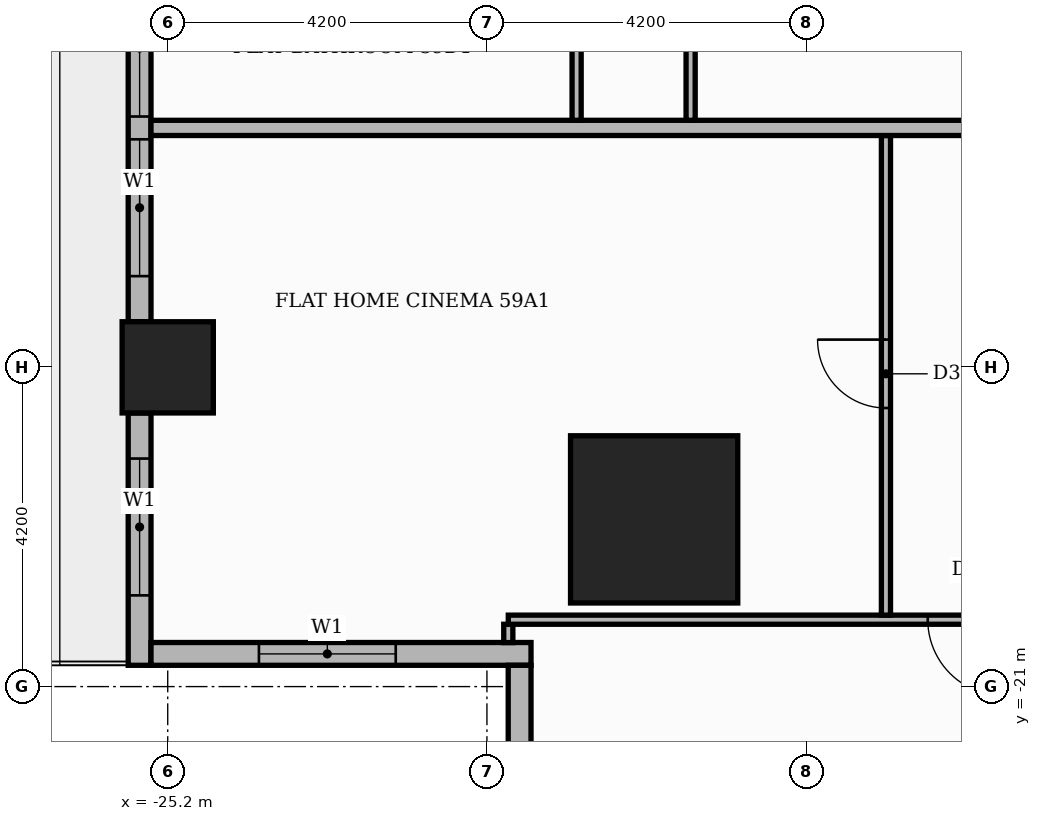
"""IFC4 building model, lengths in metres.
Left out: names, types, materials, properties, quantities, classifications, styles, units other than length and angle.
Written with IfcOpenShell. Run it as: python <this file> out.ifc"""

import sys

from ifc_helpers import new_model, si_unit, direction, frame, frame_2d, origin, origin_2d, place, context, subcontext, project, spatial, rectangle, extrude, element, fill, save


model = new_model("IFC4")
c1 = context("Model", 3, precision=1e-05, world=origin(), true_north=direction((0.0, 1.0)))
c2 = subcontext(c1, "Body", "Model", "MODEL_VIEW")
j1 = project(units=[si_unit("LENGTHUNIT", "METRE"), si_unit("PLANEANGLEUNIT", "RADIAN")], contexts=[c1])
p1 = place(None, origin())
s1 = spatial("IfcSite", under=j1, at=p1, CompositionType="ELEMENT")
p2 = place(p1, origin())
s2 = spatial("IfcBuilding", under=s1, at=p2, CompositionType="ELEMENT")
p3 = place(p2, frame((0.0, 0.0, 248.4)))
s3 = spatial("IfcBuildingStorey", under=s2, at=p3, CompositionType="ELEMENT", Elevation=248.4)
p4 = place(p3, frame((-18.8, -18.8, 0.0), z_axis=(0.0, 0.0, 1.0), x_axis=(1.0, 0.0, 0.0)))
e1 = element("IfcColumn", 1, at=p4, inside=s3, PredefinedType="COLUMN", context=c2, shape_type="SweptSolid", body=[
    extrude(rectangle(XDim=2.2, YDim=2.2, at=origin_2d()), origin(), (0.0, 0.0, 1.0), 3.9),
])
p5 = place(p3, frame((-25.2, -16.8, 0.0), z_axis=(0.0, 0.0, 1.0), x_axis=(1.0, 0.0, 0.0)))
e2 = element("IfcColumn", 2, at=p5, inside=s3, PredefinedType="COLUMN", context=c2, shape_type="SweptSolid", body=[
    extrude(rectangle(XDim=1.2, YDim=1.2, at=origin_2d()), origin(), (0.0, 0.0, 1.0), 3.9),
])
p6 = place(p3, frame((-25.57, -9.0, 0.0), z_axis=(0.0, 0.0, 1.0), x_axis=(0.0, -1.0, 0.0)))
e3 = element("IfcWall", 3, at=p6, inside=s3, PredefinedType="STANDARD", context=c2, shape_type="SweptSolid", body=[
    extrude(rectangle(XDim=7.2, YDim=0.3, at=frame_2d((3.6, 0.0))), origin(), (0.0, 0.0, 1.0), 3.48),
])
p7 = place(p6, frame((0.6, 0.0, 0.9)))
e4 = element("IfcOpeningElement", 4, at=p7, cuts=e3, PredefinedType="OPENING", context=c2, shape_type="SweptSolid", body=[
    extrude(rectangle(XDim=1.8, YDim=2.1, at=frame_2d((0.9, 1.05))), frame((0.0, 0.16, 0.0), z_axis=(0.0, -1.0, 0.0), x_axis=(1.0, 0.0, 0.0)), (0.0, 0.0, 1.0), 0.32),
])
p8 = place(p6, frame((2.7, 0.0, 0.9)))
e5 = element("IfcOpeningElement", 5, at=p8, cuts=e3, PredefinedType="OPENING", context=c2, shape_type="SweptSolid", body=[
    extrude(rectangle(XDim=1.8, YDim=2.1, at=frame_2d((0.9, 1.05))), frame((0.0, 0.16, 0.0), z_axis=(0.0, -1.0, 0.0), x_axis=(1.0, 0.0, 0.0)), (0.0, 0.0, 1.0), 0.32),
])
p9 = place(p6, frame((4.8, 0.0, 0.9)))
e6 = element("IfcOpeningElement", 6, at=p9, cuts=e3, PredefinedType="OPENING", context=c2, shape_type="SweptSolid", body=[
    extrude(rectangle(XDim=1.8, YDim=2.1, at=frame_2d((0.9, 1.05))), frame((0.0, 0.16, 0.0), z_axis=(0.0, -1.0, 0.0), x_axis=(1.0, 0.0, 0.0)), (0.0, 0.0, 1.0), 0.32),
])
p10 = place(p3, frame((-25.57, -17.4, 0.0), z_axis=(0.0, 0.0, 1.0), x_axis=(0.0, -1.0, 0.0)))
e7 = element("IfcWall", 7, at=p10, inside=s3, PredefinedType="STANDARD", context=c2, shape_type="SweptSolid", body=[
    extrude(rectangle(XDim=3.32, YDim=0.3, at=frame_2d((1.66, 0.0))), origin(), (0.0, 0.0, 1.0), 3.48),
])
p11 = place(p10, frame((0.6, 0.0, 0.9)))
e8 = element("IfcOpeningElement", 8, at=p11, cuts=e7, PredefinedType="OPENING", context=c2, shape_type="SweptSolid", body=[
    extrude(rectangle(XDim=1.8, YDim=2.1, at=frame_2d((0.9, 1.05))), frame((0.0, 0.16, 0.0), z_axis=(0.0, -1.0, 0.0), x_axis=(1.0, 0.0, 0.0)), (0.0, 0.0, 1.0), 0.32),
])
p12 = place(p3, frame((-25.42, -20.57, 0.0), z_axis=(0.0, 0.0, 1.0), x_axis=(1.0, 0.0, 0.0)))
e9 = element("IfcWall", 9, at=p12, inside=s3, PredefinedType="STANDARD", context=c2, shape_type="SweptSolid", body=[
    extrude(rectangle(XDim=5.0, YDim=0.3, at=frame_2d((2.5, 0.0))), origin(), (0.0, 0.0, 1.0), 3.48),
])
p13 = place(p12, frame((1.42, 0.0, 0.9)))
e10 = element("IfcOpeningElement", 10, at=p13, cuts=e9, PredefinedType="OPENING", context=c2, shape_type="SweptSolid", body=[
    extrude(rectangle(XDim=1.8, YDim=2.1, at=frame_2d((0.9, 1.05))), frame((0.0, 0.16, 0.0), z_axis=(0.0, -1.0, 0.0), x_axis=(1.0, 0.0, 0.0)), (0.0, 0.0, 1.0), 0.32),
])
p14 = place(p3, frame((-20.57, -20.72, 0.0), z_axis=(0.0, 0.0, 1.0), x_axis=(0.0, -1.0, 0.0)))
e11 = element("IfcWall", 11, at=p14, inside=s3, PredefinedType="STANDARD", context=c2, shape_type="SweptSolid", body=[
    extrude(rectangle(XDim=5.0, YDim=0.3, at=frame_2d((2.5, 0.0))), origin(), (0.0, 0.0, 1.0), 3.48),
])
p15 = place(p14, frame((1.48, 0.0, 0.9)))
e12 = element("IfcOpeningElement", 12, at=p15, cuts=e11, PredefinedType="OPENING", context=c2, shape_type="SweptSolid", body=[
    extrude(rectangle(XDim=1.8, YDim=2.1, at=frame_2d((0.9, 1.05))), frame((0.0, 0.16, 0.0), z_axis=(0.0, -1.0, 0.0), x_axis=(1.0, 0.0, 0.0)), (0.0, 0.0, 1.0), 0.32),
])
p16 = place(p3, frame((-20.719, -20.421, 0.0), z_axis=(0.0, 0.0, 1.0), x_axis=(0.0, 1.0, 0.0)))
e13 = element("IfcWall", 13, at=p16, inside=s3, PredefinedType="PARTITIONING", context=c2, shape_type="SweptSolid", body=[
    extrude(rectangle(XDim=0.241, YDim=0.12, at=frame_2d((0.121, 0.0))), origin(), (0.0, 0.0, 1.0), 3.48),
])
p17 = place(p3, frame((-20.719, -20.12, 0.0), z_axis=(0.0, 0.0, 1.0), x_axis=(1.0, 0.0, 0.0)))
e14 = element("IfcWall", 14, at=p17, inside=s3, PredefinedType="PARTITIONING", context=c2, shape_type="SweptSolid", body=[
    extrude(rectangle(XDim=15.469, YDim=0.12, at=frame_2d((7.734, 0.0))), origin(), (0.0, 0.0, 1.0), 3.48),
])
p18 = place(p17, frame((5.519, 0.0, 0.0)))
e15 = element("IfcOpeningElement", 15, at=p18, cuts=e14, PredefinedType="OPENING", context=c2, shape_type="SweptSolid", body=[
    extrude(rectangle(XDim=1.0, YDim=2.1, at=frame_2d((0.5, 1.05))), frame((0.0, 0.07, 0.0), z_axis=(0.0, -1.0, 0.0), x_axis=(1.0, 0.0, 0.0)), (0.0, 0.0, 1.0), 0.14),
])
p19 = place(p17, frame((8.719, 0.0, 0.0)))
e16 = element("IfcOpeningElement", 16, at=p19, cuts=e14, PredefinedType="OPENING", context=c2, shape_type="SweptSolid", body=[
    extrude(rectangle(XDim=0.9, YDim=2.1, at=frame_2d((0.45, 1.05))), frame((0.0, 0.07, 0.0), z_axis=(0.0, -1.0, 0.0), x_axis=(1.0, 0.0, 0.0)), (0.0, 0.0, 1.0), 0.14),
])
p20 = place(p3, frame((-15.75, -20.06, 0.0), z_axis=(0.0, 0.0, 1.0), x_axis=(0.0, 1.0, 0.0)))
e17 = element("IfcWall", 17, at=p20, inside=s3, PredefinedType="PARTITIONING", context=c2, shape_type="SweptSolid", body=[
    extrude(rectangle(XDim=6.31, YDim=0.12, at=frame_2d((3.155, 0.0))), origin(), (0.0, 0.0, 1.0), 3.48),
])
p21 = place(p20, frame((2.725, 0.0, 0.0)))
e18 = element("IfcOpeningElement", 18, at=p21, cuts=e17, PredefinedType="OPENING", context=c2, shape_type="SweptSolid", body=[
    extrude(rectangle(XDim=0.9, YDim=2.1, at=frame_2d((0.45, 1.05))), frame((0.0, 0.07, 0.0), z_axis=(0.0, -1.0, 0.0), x_axis=(1.0, 0.0, 0.0)), (0.0, 0.0, 1.0), 0.14),
])
p22 = place(p3, frame((-25.42, -13.65, 0.0), z_axis=(0.0, 0.0, 1.0), x_axis=(1.0, 0.0, 0.0)))
e19 = element("IfcWall", 19, at=p22, inside=s3, PredefinedType="PARTITIONING", context=c2, shape_type="SweptSolid", body=[
    extrude(rectangle(XDim=39.07, YDim=0.2, at=frame_2d((19.535, 0.0))), origin(), (0.0, 0.0, 1.0), 3.48),
])
p23 = place(p22, frame((13.32, 0.0, 0.0)))
e20 = element("IfcOpeningElement", 20, at=p23, cuts=e19, PredefinedType="OPENING", context=c2, shape_type="SweptSolid", body=[
    extrude(rectangle(XDim=1.1, YDim=2.4, at=frame_2d((0.55, 1.2))), frame((0.0, 0.11, 0.0), z_axis=(0.0, -1.0, 0.0), x_axis=(1.0, 0.0, 0.0)), (0.0, 0.0, 1.0), 0.22),
])
p24 = place(p3, frame((-19.82, -13.55, 0.0), z_axis=(0.0, 0.0, 1.0), x_axis=(0.0, 1.0, 0.0)))
e21 = element("IfcWall", 21, at=p24, inside=s3, PredefinedType="PARTITIONING", context=c2, shape_type="SweptSolid", body=[
    extrude(rectangle(XDim=1.94, YDim=0.12, at=frame_2d((0.97, 0.0))), origin(), (0.0, 0.0, 1.0), 3.48),
])
p25 = place(p3, frame((-18.32, -13.55, 0.0), z_axis=(0.0, 0.0, 1.0), x_axis=(0.0, 1.0, 0.0)))
e22 = element("IfcWall", 22, at=p25, inside=s3, PredefinedType="PARTITIONING", context=c2, shape_type="SweptSolid", body=[
    extrude(rectangle(XDim=3.59, YDim=0.12, at=frame_2d((1.795, 0.0))), origin(), (0.0, 0.0, 1.0), 3.48),
])
p26 = place(p25, frame((1.325, 0.0, 0.0)))
e23 = element("IfcOpeningElement", 23, at=p26, cuts=e22, PredefinedType="OPENING", context=c2, shape_type="SweptSolid", body=[
    extrude(rectangle(XDim=0.9, YDim=2.1, at=frame_2d((0.45, 1.05))), frame((0.0, 0.07, 0.0), z_axis=(0.0, -1.0, 0.0), x_axis=(1.0, 0.0, 0.0)), (0.0, 0.0, 1.0), 0.14),
])
p27 = place(p8, origin())
e24 = element("IfcWindow", 24, at=p27, inside=s3, PartitioningType="SINGLE_PANEL", PredefinedType="WINDOW", context=c2, shape_type="SweptSolid", body=[
    extrude(rectangle(XDim=1.8, YDim=2.1, at=frame_2d((0.9, 1.05))), frame((0.0, 0.03, 0.0), z_axis=(0.0, -1.0, 0.0), x_axis=(1.0, 0.0, 0.0)), (0.0, 0.0, 1.0), 0.06),
])
fill(e5, e24)
p28 = place(p9, origin())
e25 = element("IfcWindow", 25, at=p28, inside=s3, PartitioningType="SINGLE_PANEL", PredefinedType="WINDOW", context=c2, shape_type="SweptSolid", body=[
    extrude(rectangle(XDim=1.8, YDim=2.1, at=frame_2d((0.9, 1.05))), frame((0.0, 0.03, 0.0), z_axis=(0.0, -1.0, 0.0), x_axis=(1.0, 0.0, 0.0)), (0.0, 0.0, 1.0), 0.06),
])
fill(e6, e25)
p29 = place(p11, origin())
e26 = element("IfcWindow", 26, at=p29, inside=s3, PartitioningType="SINGLE_PANEL", PredefinedType="WINDOW", context=c2, shape_type="SweptSolid", body=[
    extrude(rectangle(XDim=1.8, YDim=2.1, at=frame_2d((0.9, 1.05))), frame((0.0, 0.03, 0.0), z_axis=(0.0, -1.0, 0.0), x_axis=(1.0, 0.0, 0.0)), (0.0, 0.0, 1.0), 0.06),
])
fill(e8, e26)
p30 = place(p13, origin())
e27 = element("IfcWindow", 27, at=p30, inside=s3, PartitioningType="SINGLE_PANEL", PredefinedType="WINDOW", context=c2, shape_type="SweptSolid", body=[
    extrude(rectangle(XDim=1.8, YDim=2.1, at=frame_2d((0.9, 1.05))), frame((0.0, 0.03, 0.0), z_axis=(0.0, -1.0, 0.0), x_axis=(1.0, 0.0, 0.0)), (0.0, 0.0, 1.0), 0.06),
])
fill(e10, e27)
p31 = place(p21, origin())
e28 = element("IfcDoor", 28, at=p31, inside=s3, OperationType="SINGLE_SWING_RIGHT", PredefinedType="DOOR", context=c2, shape_type="SweptSolid", body=[
    extrude(rectangle(XDim=0.9, YDim=2.1, at=frame_2d((0.45, 1.05))), frame((0.0, 0.025, 0.0), z_axis=(0.0, -1.0, 0.0), x_axis=(1.0, 0.0, 0.0)), (0.0, 0.0, 1.0), 0.05),
])
fill(e18, e28)
p32 = place(p18, frame((1.0, 0.0, 0.0), z_axis=(0.0, 0.0, 1.0), x_axis=(-1.0, 0.0, 0.0)))
e29 = element("IfcDoor", 29, at=p32, inside=s3, OperationType="SINGLE_SWING_RIGHT", PredefinedType="DOOR", context=c2, shape_type="SweptSolid", body=[
    extrude(rectangle(XDim=1.0, YDim=2.1, at=frame_2d((0.5, 1.05))), frame((0.0, 0.025, 0.0), z_axis=(0.0, -1.0, 0.0), x_axis=(1.0, 0.0, 0.0)), (0.0, 0.0, 1.0), 0.05),
])
fill(e15, e29)
save(model, sys.argv[1])
